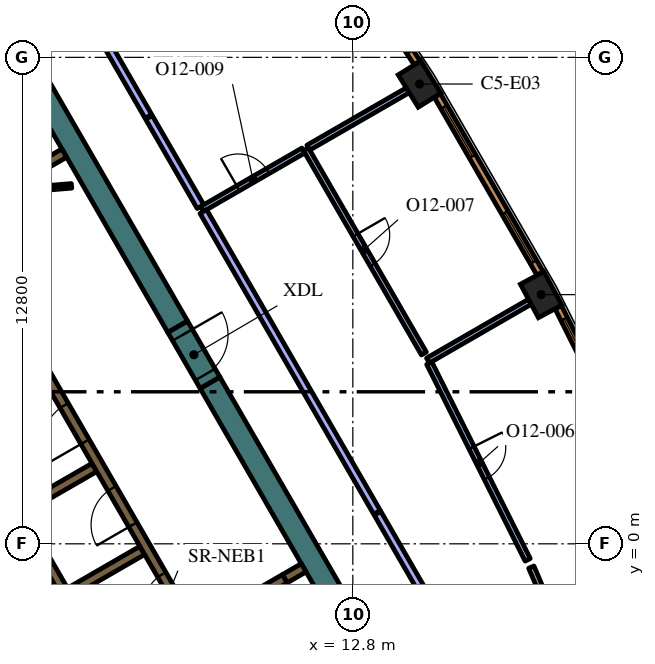
"""IFC4 building model, lengths in metres.
Left out: names, types, materials, properties, quantities, classifications, styles, units other than length and angle.
Written with IfcOpenShell. Run it as: python <this file> out.ifc"""

import sys

from ifc_helpers import new_model, si_unit, direction, frame, frame_2d, origin, origin_2d, place, context, subcontext, project, spatial, rectangle, extrude, element, fill, save


model = new_model("IFC4")
c1 = context("Model", 3, precision=1e-05, world=origin(), true_north=direction((0.0, 1.0)))
c2 = subcontext(c1, "Body", "Model", "MODEL_VIEW")
j1 = project(units=[si_unit("LENGTHUNIT", "METRE"), si_unit("PLANEANGLEUNIT", "RADIAN")], contexts=[c1])
p1 = place(None, origin())
s1 = spatial("IfcSite", under=j1, at=p1, CompositionType="ELEMENT")
p2 = place(p1, origin())
s2 = spatial("IfcBuilding", under=s1, at=p2, CompositionType="ELEMENT")
p3 = place(p2, frame((0.0, 0.0, 279.6)))
s3 = spatial("IfcBuildingStorey", under=s2, at=p3, CompositionType="ELEMENT", Elevation=279.6)
for number, where, z_axis, x_axis in (
    (1, (17.756, 6.557, 0.0), (0.0, 0.0, 1.0), (-0.474, 0.881, 0.0)),
    (2, (14.556, 12.098, 0.0), (0.0, 0.0, 1.0), (-0.526, 0.851, 0.0)),
):
    element("IfcColumn", number, at=place(p3, frame(where, z_axis=z_axis, x_axis=x_axis)), inside=s3, PredefinedType="COLUMN", context=c2, shape_type="SweptSolid", body=[
        extrude(rectangle(XDim=1.0, YDim=0.7, at=origin_2d()), origin(), (0.0, 0.0, 1.0), 4.2),
    ])
for number, where, z_axis, x_axis in (
    (3, (9.042, 4.239, 0.0), (0.0, 0.0, 1.0), (0.5, -0.866, 0.0)),
    (4, (1.989, 16.456, 0.0), (0.0, 0.0, 1.0), (0.5, -0.866, 0.0)),
):
    element("IfcWall", number, at=place(p3, frame(where, z_axis=z_axis, x_axis=x_axis)), inside=s3, PredefinedType="SOLIDWALL", context=c2, shape_type="SweptSolid", body=[
        extrude(rectangle(XDim=12.406, YDim=0.6, at=frame_2d((6.203, 0.0))), origin(), (0.0, 0.0, 1.0), 4.2),
    ])
p4 = place(p3, frame((11.507, -0.631, 0.0), z_axis=(0.0, 0.0, 1.0), x_axis=(-0.866093731455, -0.499881634324, 0.0)))
e5 = element("IfcWall", 5, at=p4, inside=s3, PredefinedType="SOLIDWALL", context=c2, shape_type="SweptSolid", body=[
    extrude(rectangle(XDim=0.575, YDim=0.25, at=frame_2d((0.288, 0.0))), origin(), (0.0, 0.0, 1.0), 4.2),
])
p5 = place(p3, frame((5.97, -2.591, 0.0), z_axis=(0.0, 0.0, 1.0), x_axis=(-0.499994469932, 0.866028596547, 0.0)))
e6 = element("IfcWall", 6, at=p5, inside=s3, PredefinedType="SOLIDWALL", context=c2, shape_type="SweptSolid", body=[
    extrude(rectangle(XDim=10.488, YDim=0.25, at=frame_2d((5.244, 0.0))), origin(), (0.0, 0.0, 1.0), 4.2),
])
for number, where, z_axis, x_axis in (
    (7, (4.094, 0.909, 0.0), (0.0, 0.0, 1.0), (0.866, 0.5, 0.0)),
    (8, (5.354, -1.274, 0.0), (0.0, 0.0, 1.0), (0.866, 0.5, 0.0)),
):
    element("IfcWall", number, at=place(p3, frame(where, z_axis=z_axis, x_axis=x_axis)), inside=s3, PredefinedType="SOLIDWALL", context=c2, shape_type="SweptSolid", body=[
        extrude(rectangle(XDim=2.2, YDim=0.25, at=frame_2d((1.1, 0.0))), origin(), (0.0, 0.0, 1.0), 4.2),
    ])
p6 = place(p3, frame((3.83, 9.486, 0.0), z_axis=(0.0, 0.0, 1.0), x_axis=(0.865986202621, 0.500067892261, 0.0)))
e9 = element("IfcWall", 9, at=p6, inside=s3, PredefinedType="SOLIDWALL", context=c2, shape_type="SweptSolid", body=[
    extrude(rectangle(XDim=1.591, YDim=0.25, at=frame_2d((0.795, 0.0))), origin(), (0.0, 0.0, 1.0), 4.2),
])
p7 = place(p3, frame((8.565, -2.185, 0.0), z_axis=(0.0, 0.0, 1.0), x_axis=(-0.499997954832, 0.866026584559, 0.0)))
e10 = element("IfcWall", 10, at=p7, inside=s3, PredefinedType="SOLIDWALL", context=c2, shape_type="SweptSolid", body=[
    extrude(rectangle(XDim=12.35, YDim=0.25, at=frame_2d((6.175, 0.0))), origin(), (0.0, 0.0, 1.0), 4.2),
])
p8 = place(p7, frame((0.685, 0.0, 0.0)))
e11 = element("IfcOpeningElement", 11, at=p8, cuts=e10, PredefinedType="OPENING", context=c2, shape_type="SweptSolid", body=[
    extrude(rectangle(XDim=0.9, YDim=2.1, at=frame_2d((0.45, 1.05))), frame((0.0, 0.135, 0.0), z_axis=(0.0, -1.0, 0.0), x_axis=(1.0, 0.0, 0.0)), (0.0, 0.0, 1.0), 0.27),
])
p9 = place(p7, frame((3.105, 0.0, 0.0)))
e12 = element("IfcOpeningElement", 12, at=p9, cuts=e10, PredefinedType="OPENING", context=c2, shape_type="SweptSolid", body=[
    extrude(rectangle(XDim=1.1, YDim=2.1, at=frame_2d((0.55, 1.05))), frame((0.0, 0.135, 0.0), z_axis=(0.0, -1.0, 0.0), x_axis=(1.0, 0.0, 0.0)), (0.0, 0.0, 1.0), 0.27),
])
p10 = place(p7, frame((5.625, 0.0, 0.0)))
e13 = element("IfcOpeningElement", 13, at=p10, cuts=e10, PredefinedType="OPENING", context=c2, shape_type="SweptSolid", body=[
    extrude(rectangle(XDim=1.1, YDim=2.1, at=frame_2d((0.55, 1.05))), frame((0.0, 0.135, 0.0), z_axis=(0.0, -1.0, 0.0), x_axis=(1.0, 0.0, 0.0)), (0.0, 0.0, 1.0), 0.27),
])
p11 = place(p7, frame((8.145, 0.0, 0.0)))
e14 = element("IfcOpeningElement", 14, at=p11, cuts=e10, PredefinedType="OPENING", context=c2, shape_type="SweptSolid", body=[
    extrude(rectangle(XDim=1.1, YDim=2.1, at=frame_2d((0.55, 1.05))), frame((0.0, 0.135, 0.0), z_axis=(0.0, -1.0, 0.0), x_axis=(1.0, 0.0, 0.0)), (0.0, 0.0, 1.0), 0.27),
])
p12 = place(p7, frame((10.665, 0.0, 0.0)))
e15 = element("IfcOpeningElement", 15, at=p12, cuts=e10, PredefinedType="OPENING", context=c2, shape_type="SweptSolid", body=[
    extrude(rectangle(XDim=1.1, YDim=2.1, at=frame_2d((0.55, 1.05))), frame((0.0, 0.135, 0.0), z_axis=(0.0, -1.0, 0.0), x_axis=(1.0, 0.0, 0.0)), (0.0, 0.0, 1.0), 0.27),
])
p13 = place(p3, frame((5.398, 9.419, 0.0), z_axis=(0.0, 0.0, 1.0), x_axis=(-0.996653416376, -0.081743303248, 0.0)))
e16 = element("IfcWall", 16, at=p13, inside=s3, PredefinedType="PARTITIONING", context=c2, shape_type="SweptSolid", body=[
    extrude(rectangle(XDim=2.7, YDim=0.12, at=frame_2d((1.35, 0.0))), origin(), (0.0, 0.0, 1.0), 3.55),
])
p14 = place(p13, frame((1.45, 0.0, 0.0)))
e17 = element("IfcOpeningElement", 17, at=p14, cuts=e16, PredefinedType="OPENING", context=c2, shape_type="SweptSolid", body=[
    extrude(rectangle(XDim=0.9, YDim=2.1, at=frame_2d((0.45, 1.05))), frame((0.0, 0.07, 0.0), z_axis=(0.0, -1.0, 0.0), x_axis=(1.0, 0.0, 0.0)), (0.0, 0.0, 1.0), 0.14),
])
p15 = place(p3, frame((11.009, -0.919, 0.0), z_axis=(0.0, 0.0, 1.0), x_axis=(-0.866059744384, -0.49994051562, 0.0)))
e18 = element("IfcWall", 18, at=p15, inside=s3, PredefinedType="SOLIDWALL", context=c2, shape_type="SweptSolid", body=[
    extrude(rectangle(XDim=2.1, YDim=0.25, at=frame_2d((1.05, 0.0))), origin(), (0.0, 0.0, 1.0), 4.2),
])
p16 = place(p15, frame((0.45, 0.0, 0.0)))
e19 = element("IfcOpeningElement", 19, at=p16, cuts=e18, PredefinedType="OPENING", context=c2, shape_type="SweptSolid", body=[
    extrude(rectangle(XDim=1.2, YDim=2.1, at=frame_2d((0.6, 1.05))), frame((0.0, 0.135, 0.0), z_axis=(0.0, -1.0, 0.0), x_axis=(1.0, 0.0, 0.0)), (0.0, 0.0, 1.0), 0.27),
])
p17 = place(p3, frame((8.192, 5.711, 0.0), z_axis=(0.0, 0.0, 1.0), x_axis=(0.500062241894, -0.865989465428, 0.0)))
e20 = element("IfcWall", 20, at=p17, inside=s3, PredefinedType="SOLIDWALL", context=c2, shape_type="SweptSolid", body=[
    extrude(rectangle(XDim=1.7, YDim=0.6, at=frame_2d((0.85, 0.0))), origin(), (0.0, 0.0, 1.0), 4.2),
])
p18 = place(p17, frame((0.25, 0.0, 0.0)))
e21 = element("IfcOpeningElement", 21, at=p18, cuts=e20, PredefinedType="OPENING", context=c2, shape_type="SweptSolid", body=[
    extrude(rectangle(XDim=1.2, YDim=2.1, at=frame_2d((0.6, 1.05))), frame((0.0, 0.31, 0.0), z_axis=(0.0, -1.0, 0.0), x_axis=(1.0, 0.0, 0.0)), (0.0, 0.0, 1.0), 0.62),
])
p19 = place(p3, frame((14.777, 4.822, 0.0), z_axis=(0.0, 0.0, 1.0), x_axis=(0.865992557167, 0.500056887695, 0.0)))
e22 = element("IfcWall", 22, at=p19, inside=s3, PredefinedType="PARTITIONING", context=c2, shape_type="SweptSolid", body=[
    extrude(rectangle(XDim=3.096, YDim=0.15, at=frame_2d((1.548, 0.0))), origin(), (0.0, 0.0, 1.0), 3.55),
])
p20 = place(p3, frame((18.877, -3.84, 0.0), z_axis=(0.0, 0.0, 1.0), x_axis=(-0.393339985587, 0.919393090978, 0.0)))
e23 = element("IfcWall", 23, at=p20, inside=s3, PredefinedType="PARTITIONING", context=c2, shape_type="SweptSolid", body=[
    extrude(rectangle(XDim=3.51, YDim=0.15, at=frame_2d((1.755, 0.0))), origin(), (0.0, 0.0, 1.0), 3.55),
])
p21 = place(p3, frame((14.811, 4.754, 0.0), z_axis=(0.0, 0.0, 1.0), x_axis=(0.447483524661, -0.894292175498, 0.0)))
e24 = element("IfcWall", 24, at=p21, inside=s3, PredefinedType="PARTITIONING", context=c2, shape_type="SweptSolid", body=[
    extrude(rectangle(XDim=5.788, YDim=0.15, at=frame_2d((2.894, 0.0))), origin(), (0.0, 0.0, 1.0), 3.55),
])
p22 = place(p21, frame((2.488, 0.0, 0.0)))
e25 = element("IfcOpeningElement", 25, at=p22, cuts=e24, PredefinedType="OPENING", context=c2, shape_type="SweptSolid", body=[
    extrude(rectangle(XDim=0.9, YDim=2.1, at=frame_2d((0.45, 1.05))), frame((0.0, 0.085, 0.0), z_axis=(0.0, -1.0, 0.0), x_axis=(1.0, 0.0, 0.0)), (0.0, 0.0, 1.0), 0.17),
])
p23 = place(p3, frame((11.564, 10.387, 0.0), z_axis=(0.0, 0.0, 1.0), x_axis=(0.500002559113, -0.866023926275, 0.0)))
e26 = element("IfcWall", 26, at=p23, inside=s3, PredefinedType="PARTITIONING", context=c2, shape_type="SweptSolid", body=[
    extrude(rectangle(XDim=6.212, YDim=0.15, at=frame_2d((3.106, 0.0))), origin(), (0.0, 0.0, 1.0), 3.55),
])
p24 = place(p23, frame((2.612, 0.0, 0.0)))
e27 = element("IfcOpeningElement", 27, at=p24, cuts=e26, PredefinedType="OPENING", context=c2, shape_type="SweptSolid", body=[
    extrude(rectangle(XDim=0.9, YDim=2.1, at=frame_2d((0.45, 1.05))), frame((0.0, 0.085, 0.0), z_axis=(0.0, -1.0, 0.0), x_axis=(1.0, 0.0, 0.0)), (0.0, 0.0, 1.0), 0.17),
])
p25 = place(p3, frame((11.629, 10.424, 0.0), z_axis=(0.0, 0.0, 1.0), x_axis=(0.866061796884, 0.499936960004, 0.0)))
e28 = element("IfcWall", 28, at=p25, inside=s3, PredefinedType="PARTITIONING", context=c2, shape_type="SweptSolid", body=[
    extrude(rectangle(XDim=3.021, YDim=0.15, at=frame_2d((1.511, 0.0))), origin(), (0.0, 0.0, 1.0), 3.55),
])
p26 = place(p3, frame((8.829, 8.808, 0.0), z_axis=(0.0, 0.0, 1.0), x_axis=(0.866041857893, 0.499971499565, 0.0)))
e29 = element("IfcWall", 29, at=p26, inside=s3, PredefinedType="PARTITIONING", context=c2, shape_type="SweptSolid", body=[
    extrude(rectangle(XDim=3.083, YDim=0.15, at=frame_2d((1.542, 0.0))), origin(), (0.0, 0.0, 1.0), 3.55),
])
p27 = place(p26, frame((1.1, 0.0, 0.0)))
e30 = element("IfcOpeningElement", 30, at=p27, cuts=e29, PredefinedType="OPENING", context=c2, shape_type="SweptSolid", body=[
    extrude(rectangle(XDim=0.9, YDim=2.1, at=frame_2d((0.45, 1.05))), frame((0.0, 0.085, 0.0), z_axis=(0.0, -1.0, 0.0), x_axis=(1.0, 0.0, 0.0)), (0.0, 0.0, 1.0), 0.17),
])
p28 = place(p3, frame((13.436, 0.829, 0.0), z_axis=(0.0, 0.0, 1.0), x_axis=(-0.499983789798, 0.866034762547, 0.0)))
e31 = element("IfcWall", 31, at=p28, inside=s3, PredefinedType="PARTITIONING", context=c2, shape_type="SweptSolid", body=[
    extrude(rectangle(XDim=9.138, YDim=0.2, at=frame_2d((4.569, 0.0))), origin(), (0.0, 0.0, 1.0), 3.55),
])
p29 = place(p3, frame((17.565, -6.324, 0.0), z_axis=(0.0, 0.0, 1.0), x_axis=(-0.499977548053, 0.866038366034, 0.0)))
e32 = element("IfcWall", 32, at=p29, inside=s3, PredefinedType="PARTITIONING", context=c2, shape_type="SweptSolid", body=[
    extrude(rectangle(XDim=8.229, YDim=0.2, at=frame_2d((4.115, 0.0))), origin(), (0.0, 0.0, 1.0), 3.55),
])
p30 = place(p3, frame((8.792, 8.873, 0.0), z_axis=(0.0, 0.0, 1.0), x_axis=(-0.499992600721, 0.866029675718, 0.0)))
e33 = element("IfcWall", 33, at=p30, inside=s3, PredefinedType="PARTITIONING", context=c2, shape_type="SweptSolid", body=[
    extrude(rectangle(XDim=2.712, YDim=0.2, at=frame_2d((1.356, 0.0))), origin(), (0.0, 0.0, 1.0), 3.55),
])
p31 = place(p3, frame((7.421, 11.247, 0.0), z_axis=(0.0, 0.0, 1.0), x_axis=(-0.499999024953, 0.866025966727, 0.0)))
e34 = element("IfcWall", 34, at=p31, inside=s3, PredefinedType="PARTITIONING", context=c2, shape_type="SweptSolid", body=[
    extrude(rectangle(XDim=7.769, YDim=0.2, at=frame_2d((3.884, 0.0))), origin(), (0.0, 0.0, 1.0), 3.55),
])
p32 = place(p3, frame((20.625, 1.392, 0.0), z_axis=(0.0, 0.0, 1.0), x_axis=(-0.447484531401, 0.894291671747, 0.0)))
e35 = element("IfcWall", 35, at=p32, inside=s3, PredefinedType="SOLIDWALL", context=c2, shape_type="SweptSolid", body=[
    extrude(rectangle(XDim=5.406, YDim=0.19, at=frame_2d((2.703, 0.0))), origin(), (0.0, 0.0, 1.0), 3.95),
])
p33 = place(p32, frame((0.346, 0.0, 0.6)))
e36 = element("IfcOpeningElement", 36, at=p33, cuts=e35, PredefinedType="OPENING", context=c2, shape_type="SweptSolid", body=[
    extrude(rectangle(XDim=1.5, YDim=2.85, at=frame_2d((0.75, 1.425))), frame((0.0, 0.105, 0.0), z_axis=(0.0, -1.0, 0.0), x_axis=(1.0, 0.0, 0.0)), (0.0, 0.0, 1.0), 0.21),
])
p34 = place(p32, frame((3.559, 0.0, 0.6)))
e37 = element("IfcOpeningElement", 37, at=p34, cuts=e35, PredefinedType="OPENING", context=c2, shape_type="SweptSolid", body=[
    extrude(rectangle(XDim=1.5, YDim=2.85, at=frame_2d((0.75, 1.425))), frame((0.0, 0.105, 0.0), z_axis=(0.0, -1.0, 0.0), x_axis=(1.0, 0.0, 0.0)), (0.0, 0.0, 1.0), 0.21),
])
p35 = place(p3, frame((17.728, 7.114, 0.0), z_axis=(0.0, 0.0, 1.0), x_axis=(-0.500024767483, 0.866011103799, 0.0)))
e38 = element("IfcWall", 38, at=p35, inside=s3, PredefinedType="SOLIDWALL", context=c2, shape_type="SweptSolid", body=[
    extrude(rectangle(XDim=5.406, YDim=0.19, at=frame_2d((2.703, 0.0))), origin(), (0.0, 0.0, 1.0), 3.95),
])
p36 = place(p35, frame((0.346, 0.0, 0.6)))
e39 = element("IfcOpeningElement", 39, at=p36, cuts=e38, PredefinedType="OPENING", context=c2, shape_type="SweptSolid", body=[
    extrude(rectangle(XDim=1.5, YDim=2.85, at=frame_2d((0.75, 1.425))), frame((0.0, 0.105, 0.0), z_axis=(0.0, -1.0, 0.0), x_axis=(1.0, 0.0, 0.0)), (0.0, 0.0, 1.0), 0.21),
])
p37 = place(p35, frame((3.56, 0.0, 0.6)))
e40 = element("IfcOpeningElement", 40, at=p37, cuts=e38, PredefinedType="OPENING", context=c2, shape_type="SweptSolid", body=[
    extrude(rectangle(XDim=1.5, YDim=2.85, at=frame_2d((0.75, 1.425))), frame((0.0, 0.105, 0.0), z_axis=(0.0, -1.0, 0.0), x_axis=(1.0, 0.0, 0.0)), (0.0, 0.0, 1.0), 0.21),
])
p38 = place(p3, frame((14.496, 12.653, 0.0), z_axis=(0.0, 0.0, 1.0), x_axis=(-0.550744054781, 0.83467417962, 0.0)))
e41 = element("IfcWall", 41, at=p38, inside=s3, PredefinedType="SOLIDWALL", context=c2, shape_type="SweptSolid", body=[
    extrude(rectangle(XDim=5.406, YDim=0.19, at=frame_2d((2.703, 0.0))), origin(), (0.0, 0.0, 1.0), 3.95),
])
p39 = place(p38, frame((0.346, 0.0, 0.6)))
e42 = element("IfcOpeningElement", 42, at=p39, cuts=e41, PredefinedType="OPENING", context=c2, shape_type="SweptSolid", body=[
    extrude(rectangle(XDim=1.5, YDim=2.85, at=frame_2d((0.75, 1.425))), frame((0.0, 0.105, 0.0), z_axis=(0.0, -1.0, 0.0), x_axis=(1.0, 0.0, 0.0)), (0.0, 0.0, 1.0), 0.21),
])
p40 = place(p38, frame((3.559, 0.0, 0.6)))
e43 = element("IfcOpeningElement", 43, at=p40, cuts=e41, PredefinedType="OPENING", context=c2, shape_type="SweptSolid", body=[
    extrude(rectangle(XDim=1.5, YDim=2.85, at=frame_2d((0.75, 1.425))), frame((0.0, 0.105, 0.0), z_axis=(0.0, -1.0, 0.0), x_axis=(1.0, 0.0, 0.0)), (0.0, 0.0, 1.0), 0.21),
])
p41 = place(p8, origin())
e44 = element("IfcDoor", 44, at=p41, inside=s3, OperationType="SINGLE_SWING_LEFT", PredefinedType="DOOR", context=c2, shape_type="SweptSolid", body=[
    extrude(rectangle(XDim=0.9, YDim=2.1, at=frame_2d((0.45, 1.05))), frame((0.0, 0.025, 0.0), z_axis=(0.0, -1.0, 0.0), x_axis=(1.0, 0.0, 0.0)), (0.0, 0.0, 1.0), 0.05),
])
fill(e11, e44)
p42 = place(p9, origin())
e45 = element("IfcDoor", 45, at=p42, inside=s3, OperationType="DOUBLE_DOOR_SLIDING", PredefinedType="DOOR", context=c2, shape_type="SweptSolid", body=[
    extrude(rectangle(XDim=1.1, YDim=2.1, at=frame_2d((0.55, 1.05))), frame((0.0, 0.025, 0.0), z_axis=(0.0, -1.0, 0.0), x_axis=(1.0, 0.0, 0.0)), (0.0, 0.0, 1.0), 0.05),
])
fill(e12, e45)
p43 = place(p10, origin())
e46 = element("IfcDoor", 46, at=p43, inside=s3, OperationType="DOUBLE_DOOR_SLIDING", PredefinedType="DOOR", context=c2, shape_type="SweptSolid", body=[
    extrude(rectangle(XDim=1.1, YDim=2.1, at=frame_2d((0.55, 1.05))), frame((0.0, 0.025, 0.0), z_axis=(0.0, -1.0, 0.0), x_axis=(1.0, 0.0, 0.0)), (0.0, 0.0, 1.0), 0.05),
])
fill(e13, e46)
p44 = place(p18, origin())
e47 = element("IfcDoor", 47, at=p44, inside=s3, OperationType="SINGLE_SWING_LEFT", PredefinedType="DOOR", context=c2, shape_type="SweptSolid", body=[
    extrude(rectangle(XDim=1.2, YDim=2.1, at=frame_2d((0.6, 1.05))), frame((0.0, 0.025, 0.0), z_axis=(0.0, -1.0, 0.0), x_axis=(1.0, 0.0, 0.0)), (0.0, 0.0, 1.0), 0.05),
])
fill(e21, e47)
p45 = place(p22, origin())
e48 = element("IfcDoor", 48, at=p45, inside=s3, OperationType="SINGLE_SWING_RIGHT", PredefinedType="DOOR", context=c2, shape_type="SweptSolid", body=[
    extrude(rectangle(XDim=0.9, YDim=2.1, at=frame_2d((0.45, 1.05))), frame((0.0, 0.025, 0.0), z_axis=(0.0, -1.0, 0.0), x_axis=(1.0, 0.0, 0.0)), (0.0, 0.0, 1.0), 0.05),
])
fill(e25, e48)
p46 = place(p24, origin())
e49 = element("IfcDoor", 49, at=p46, inside=s3, OperationType="SINGLE_SWING_LEFT", PredefinedType="DOOR", context=c2, shape_type="SweptSolid", body=[
    extrude(rectangle(XDim=0.9, YDim=2.1, at=frame_2d((0.45, 1.05))), frame((0.0, 0.025, 0.0), z_axis=(0.0, -1.0, 0.0), x_axis=(1.0, 0.0, 0.0)), (0.0, 0.0, 1.0), 0.05),
])
fill(e27, e49)
p47 = place(p27, origin())
e50 = element("IfcDoor", 50, at=p47, inside=s3, OperationType="SINGLE_SWING_RIGHT", PredefinedType="DOOR", context=c2, shape_type="SweptSolid", body=[
    extrude(rectangle(XDim=0.9, YDim=2.1, at=frame_2d((0.45, 1.05))), frame((0.0, 0.025, 0.0), z_axis=(0.0, -1.0, 0.0), x_axis=(1.0, 0.0, 0.0)), (0.0, 0.0, 1.0), 0.05),
])
fill(e30, e50)
p48 = place(p34, origin())
e51 = element("IfcWindow", 51, at=p48, inside=s3, PartitioningType="SINGLE_PANEL", PredefinedType="WINDOW", context=c2, shape_type="SweptSolid", body=[
    extrude(rectangle(XDim=1.5, YDim=2.85, at=frame_2d((0.75, 1.425))), frame((0.0, 0.045, 0.0), z_axis=(0.0, -1.0, 0.0), x_axis=(1.0, 0.0, 0.0)), (0.0, 0.0, 1.0), 0.06),
])
fill(e37, e51)
p49 = place(p36, origin())
e52 = element("IfcWindow", 52, at=p49, inside=s3, PartitioningType="SINGLE_PANEL", PredefinedType="WINDOW", context=c2, shape_type="SweptSolid", body=[
    extrude(rectangle(XDim=1.5, YDim=2.85, at=frame_2d((0.75, 1.425))), frame((0.0, 0.045, 0.0), z_axis=(0.0, -1.0, 0.0), x_axis=(1.0, 0.0, 0.0)), (0.0, 0.0, 1.0), 0.06),
])
fill(e39, e52)
p50 = place(p37, origin())
e53 = element("IfcWindow", 53, at=p50, inside=s3, PartitioningType="SINGLE_PANEL", PredefinedType="WINDOW", context=c2, shape_type="SweptSolid", body=[
    extrude(rectangle(XDim=1.5, YDim=2.85, at=frame_2d((0.75, 1.425))), frame((0.0, 0.045, 0.0), z_axis=(0.0, -1.0, 0.0), x_axis=(1.0, 0.0, 0.0)), (0.0, 0.0, 1.0), 0.06),
])
fill(e40, e53)
p51 = place(p39, origin())
e54 = element("IfcWindow", 54, at=p51, inside=s3, PartitioningType="SINGLE_PANEL", PredefinedType="WINDOW", context=c2, shape_type="SweptSolid", body=[
    extrude(rectangle(XDim=1.5, YDim=2.85, at=frame_2d((0.75, 1.425))), frame((0.0, 0.045, 0.0), z_axis=(0.0, -1.0, 0.0), x_axis=(1.0, 0.0, 0.0)), (0.0, 0.0, 1.0), 0.06),
])
fill(e42, e54)
save(model, sys.argv[1])
